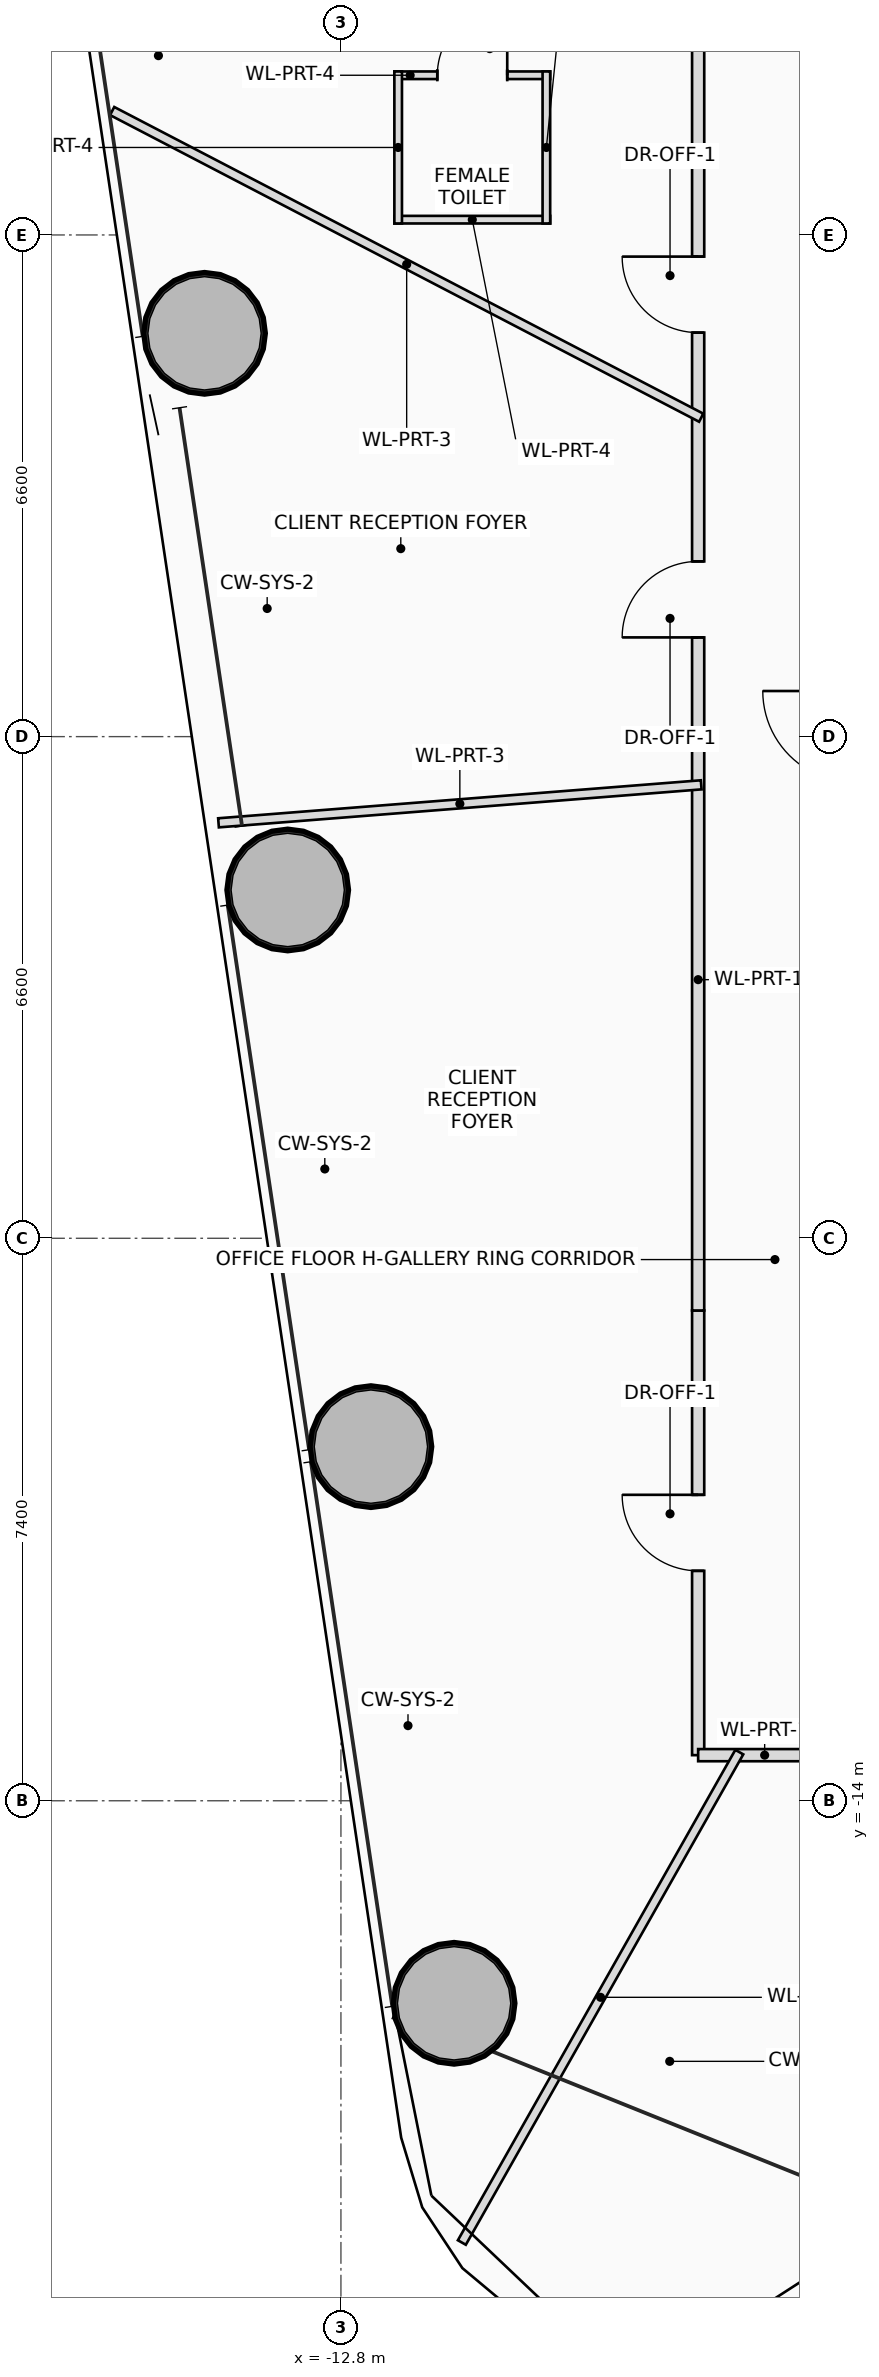
"""IFC4 building model, lengths in metres.
Left out: names, types, materials, properties, quantities, classifications, styles, units other than length and angle.
Written with IfcOpenShell. Run it as: python <this file> out.ifc"""

import sys

from ifc_helpers import new_model, si_unit, direction, frame, frame_2d, origin, origin_2d, place, context, subcontext, project, spatial, rectangle, hollow_circle, extrude, source, transform, mapped, element, fill, save


model = new_model("IFC4")
c1 = context("Model", 3, precision=1e-05, world=origin(), true_north=direction((0.0, 1.0)))
c2 = subcontext(c1, "Body", "Model", "MODEL_VIEW")
j1 = project(units=[si_unit("LENGTHUNIT", "METRE"), si_unit("PLANEANGLEUNIT", "RADIAN")], contexts=[c1])
p1 = place(None, origin())
s1 = spatial("IfcSite", under=j1, at=p1, CompositionType="ELEMENT")
p2 = place(p1, origin())
s2 = spatial("IfcBuilding", under=s1, at=p2, CompositionType="ELEMENT")
p3 = place(p2, frame((0.0, 0.0, 66.05)))
s3 = spatial("IfcBuildingStorey", under=s2, at=p3, CompositionType="ELEMENT", Elevation=66.05)
m1 = source(origin(), c2, "Body", "SweptSolid", [
    extrude(hollow_circle(Radius=0.8, WallThickness=0.055, at=origin_2d()), origin(), (0.0, 0.0, 1.0), 3.75),
])
for number, where, z_axis, x_axis in (
    (1, (-14.594, 5.306, 0.0), (0.0, 0.0, 1.0), (1.0, 0.0, 0.0)),
    (2, (-13.5, -2.018, 0.0), (0.0, 0.0, 1.0), (1.0, 0.0, 0.0)),
    (3, (-12.406, -9.341, 0.0), (0.0, 0.0, 1.0), (1.0, 0.0, 0.0)),
    (4, (-11.311, -16.665, 0.0), (0.0, 0.0, 1.0), (1.0, 0.0, 0.0)),
):
    element("IfcColumn", number, at=place(p3, frame(where, z_axis=z_axis, x_axis=x_axis)), inside=s3, PredefinedType="COLUMN", context=c2, shape_type="MappedRepresentation", body=[
        mapped(m1, transform((0.0, 0.0, 0.0), scale=1.0)),
    ])
p4 = place(p3, frame((-12.097, 8.701, 0.0), z_axis=(0.0, 0.0, 1.0), x_axis=(1.0, 0.0, 0.0)))
e5 = element("IfcWall", 5, at=p4, inside=s3, PredefinedType="PARTITIONING", context=c2, shape_type="SweptSolid", body=[
    extrude(rectangle(XDim=2.05, YDim=0.1, at=frame_2d((1.025, 0.0))), origin(), (0.0, 0.0, 1.0), 2.85),
])
p5 = place(p4, frame((0.565, 0.0, 0.0)))
e6 = element("IfcOpeningElement", 6, at=p5, cuts=e5, PredefinedType="OPENING", context=c2, shape_type="SweptSolid", body=[
    extrude(rectangle(XDim=0.92, YDim=2.1, at=frame_2d((0.46, 1.05))), frame((0.0, 0.06, 0.0), z_axis=(0.0, -1.0, 0.0), x_axis=(1.0, 0.0, 0.0)), (0.0, 0.0, 1.0), 0.12),
])
p6 = place(p3, frame((-10.047, 6.801, 0.0), z_axis=(0.0, 0.0, 1.0), x_axis=(-1.0, 0.0, 0.0)))
e7 = element("IfcWall", 7, at=p6, inside=s3, PredefinedType="PARTITIONING", context=c2, shape_type="SweptSolid", body=[
    extrude(rectangle(XDim=2.05, YDim=0.1, at=frame_2d((1.025, 0.0))), origin(), (0.0, 0.0, 1.0), 3.05),
])
p7 = place(p3, frame((-10.097, 8.751, 0.0), z_axis=(0.0, 0.0, 1.0), x_axis=(0.0, -1.0, 0.0)))
e8 = element("IfcWall", 8, at=p7, inside=s3, PredefinedType="PARTITIONING", context=c2, shape_type="SweptSolid", body=[
    extrude(rectangle(XDim=2.0, YDim=0.1, at=frame_2d((1.0, 0.0))), origin(), (0.0, 0.0, 1.0), 2.85),
])
p8 = place(p3, frame((-12.047, 6.751, 0.0), z_axis=(0.0, 0.0, 1.0), x_axis=(0.0, 1.0, 0.0)))
e9 = element("IfcWall", 9, at=p8, inside=s3, PredefinedType="PARTITIONING", context=c2, shape_type="SweptSolid", body=[
    extrude(rectangle(XDim=2.0, YDim=0.1, at=frame_2d((1.0, 0.0))), origin(), (0.0, 0.0, 1.0), 3.545),
])
p9 = place(p3, frame((-8.1, -13.4, 0.0), z_axis=(0.0, 0.0, 1.0), x_axis=(0.0, 1.0, 0.0)))
e10 = element("IfcWall", 10, at=p9, inside=s3, PredefinedType="PARTITIONING", context=c2, shape_type="SweptSolid", body=[
    extrude(rectangle(XDim=5.85, YDim=0.16, at=frame_2d((2.925, 0.0))), origin(), (0.0, 0.0, 1.0), 2.85),
])
p10 = place(p9, frame((2.425, 0.0, 0.0)))
e11 = element("IfcOpeningElement", 11, at=p10, cuts=e10, PredefinedType="OPENING", context=c2, shape_type="SweptSolid", body=[
    extrude(rectangle(XDim=1.0, YDim=2.25, at=frame_2d((0.5, 1.125))), frame((0.0, 0.09, 0.0), z_axis=(0.0, -1.0, 0.0), x_axis=(1.0, 0.0, 0.0)), (0.0, 0.0, 1.0), 0.18),
])
p11 = place(p3, frame((-8.1, -7.55, 0.0), z_axis=(0.0, 0.0, 1.0), x_axis=(0.0, 1.0, 0.0)))
e12 = element("IfcWall", 12, at=p11, inside=s3, PredefinedType="PARTITIONING", context=c2, shape_type="SweptSolid", body=[
    extrude(rectangle(XDim=15.1, YDim=0.16, at=frame_2d((7.55, 0.0))), origin(), (0.0, 0.0, 1.0), 2.85),
])
p12 = place(p11, frame((8.855, 0.0, 0.0)))
e13 = element("IfcOpeningElement", 13, at=p12, cuts=e12, PredefinedType="OPENING", context=c2, shape_type="SweptSolid", body=[
    extrude(rectangle(XDim=1.0, YDim=2.25, at=frame_2d((0.5, 1.125))), frame((0.0, 0.09, 0.0), z_axis=(0.0, -1.0, 0.0), x_axis=(1.0, 0.0, 0.0)), (0.0, 0.0, 1.0), 0.18),
])
p13 = place(p11, frame((12.865, 0.0, 0.0)))
e14 = element("IfcOpeningElement", 14, at=p13, cuts=e12, PredefinedType="OPENING", context=c2, shape_type="SweptSolid", body=[
    extrude(rectangle(XDim=1.0, YDim=2.25, at=frame_2d((0.5, 1.125))), frame((0.0, 0.09, 0.0), z_axis=(0.0, -1.0, 0.0), x_axis=(1.0, 0.0, 0.0)), (0.0, 0.0, 1.0), 0.18),
])
p14 = place(p3, frame((-8.1, 7.55, 0.0), z_axis=(0.0, 0.0, 1.0), x_axis=(0.0, 1.0, 0.0)))
e15 = element("IfcWall", 15, at=p14, inside=s3, PredefinedType="PARTITIONING", context=c2, shape_type="SweptSolid", body=[
    extrude(rectangle(XDim=5.85, YDim=0.16, at=frame_2d((2.925, 0.0))), origin(), (0.0, 0.0, 1.0), 2.85),
])
p15 = place(p3, frame((-6.35, -13.4, 0.0), z_axis=(0.0, 0.0, 1.0), x_axis=(-1.0, 0.0, 0.0)))
e16 = element("IfcWall", 16, at=p15, inside=s3, PredefinedType="PARTITIONING", context=c2, shape_type="SweptSolid", body=[
    extrude(rectangle(XDim=1.75, YDim=0.16, at=frame_2d((0.875, 0.0))), origin(), (0.0, 0.0, 1.0), 3.545),
])
p16 = place(p3, frame((-8.06, 4.196, 0.0), z_axis=(0.0, 0.0, 1.0), x_axis=(-0.887015422537, 0.461739797052, 0.0)))
e17 = element("IfcWall", 17, at=p16, inside=s3, PredefinedType="PARTITIONING", context=c2, shape_type="SweptSolid", body=[
    extrude(rectangle(XDim=8.738, YDim=0.12, at=frame_2d((4.369, 0.0))), origin(), (0.0, 0.0, 1.0), 2.85),
])
p17 = place(p3, frame((-8.06, -0.634, 0.0), z_axis=(0.0, 0.0, 1.0), x_axis=(-0.996917899667, -0.078451904529, 0.0)))
e18 = element("IfcWall", 18, at=p17, inside=s3, PredefinedType="PARTITIONING", context=c2, shape_type="SweptSolid", body=[
    extrude(rectangle(XDim=6.37, YDim=0.12, at=frame_2d((3.185, 0.0))), origin(), (0.0, 0.0, 1.0), 3.01),
])
p18 = place(p3, frame((-7.559, -13.36, 0.0), z_axis=(0.0, 0.0, 1.0), x_axis=(-0.492445728691, -0.870343153184, 0.0)))
e19 = element("IfcWall", 19, at=p18, inside=s3, PredefinedType="PARTITIONING", context=c2, shape_type="SweptSolid", body=[
    extrude(rectangle(XDim=7.413, YDim=0.12, at=frame_2d((3.707, 0.0))), origin(), (0.0, 0.0, 1.0), 3.01),
])
p19 = place(p5, origin())
e20 = element("IfcDoor", 20, at=p19, inside=s3, OperationType="SINGLE_SWING_RIGHT", PredefinedType="DOOR", context=c2, shape_type="SweptSolid", body=[
    extrude(rectangle(XDim=0.92, YDim=2.1, at=frame_2d((0.46, 1.05))), frame((0.0, 0.025, 0.0), z_axis=(0.0, -1.0, 0.0), x_axis=(1.0, 0.0, 0.0)), (0.0, 0.0, 1.0), 0.05),
])
fill(e6, e20)
p20 = place(p10, origin())
e21 = element("IfcDoor", 21, at=p20, inside=s3, OperationType="SINGLE_SWING_RIGHT", PredefinedType="DOOR", context=c2, shape_type="SweptSolid", body=[
    extrude(rectangle(XDim=1.0, YDim=2.25, at=frame_2d((0.5, 1.125))), frame((0.0, 0.025, 0.0), z_axis=(0.0, -1.0, 0.0), x_axis=(1.0, 0.0, 0.0)), (0.0, 0.0, 1.0), 0.05),
])
fill(e11, e21)
p21 = place(p12, origin())
e22 = element("IfcDoor", 22, at=p21, inside=s3, OperationType="SINGLE_SWING_LEFT", PredefinedType="DOOR", context=c2, shape_type="SweptSolid", body=[
    extrude(rectangle(XDim=1.0, YDim=2.25, at=frame_2d((0.5, 1.125))), frame((0.0, 0.025, 0.0), z_axis=(0.0, -1.0, 0.0), x_axis=(1.0, 0.0, 0.0)), (0.0, 0.0, 1.0), 0.05),
])
fill(e13, e22)
p22 = place(p13, origin())
e23 = element("IfcDoor", 23, at=p22, inside=s3, OperationType="SINGLE_SWING_RIGHT", PredefinedType="DOOR", context=c2, shape_type="SweptSolid", body=[
    extrude(rectangle(XDim=1.0, YDim=2.25, at=frame_2d((0.5, 1.125))), frame((0.0, 0.025, 0.0), z_axis=(0.0, -1.0, 0.0), x_axis=(1.0, 0.0, 0.0)), (0.0, 0.0, 1.0), 0.05),
])
fill(e14, e23)
save(model, sys.argv[1])
